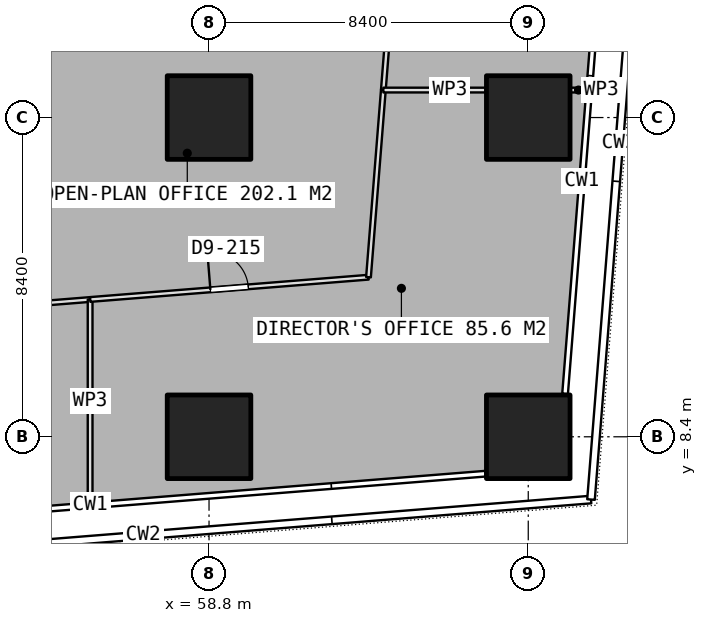
"""IFC4 building model, lengths in metres.
Left out: names, types, materials, properties, quantities, classifications, styles, units other than length and angle.
Written with IfcOpenShell. Run it as: python <this file> out.ifc"""

import sys

from ifc_helpers import new_model, si_unit, direction, frame, frame_2d, origin, origin_2d, place, context, subcontext, project, spatial, rectangle, extrude, element, fill, save


model = new_model("IFC4")
c1 = context("Model", 3, precision=1e-05, world=origin(), true_north=direction((0.0, 1.0)))
c2 = subcontext(c1, "Body", "Model", "MODEL_VIEW")
j1 = project(units=[si_unit("LENGTHUNIT", "METRE"), si_unit("PLANEANGLEUNIT", "RADIAN")], contexts=[c1])
p1 = place(None, origin())
s1 = spatial("IfcSite", under=j1, at=p1, CompositionType="ELEMENT")
p2 = place(p1, origin())
s2 = spatial("IfcBuilding", under=s1, at=p2, CompositionType="ELEMENT")
p3 = place(p2, frame((0.0, 0.0, 66.65)))
s3 = spatial("IfcBuildingStorey", under=s2, at=p3, CompositionType="ELEMENT", Elevation=66.65)
for number, where, z_axis, x_axis in (
    (1, (58.8, 8.4, 0.0), (0.0, 0.0, 1.0), (1.0, 0.0, 0.0)),
    (2, (58.8, 16.8, 0.0), (0.0, 0.0, 1.0), (1.0, 0.0, 0.0)),
    (3, (67.2, 8.4, 0.0), (0.0, 0.0, 1.0), (1.0, 0.0, 0.0)),
    (4, (67.2, 16.8, 0.0), (0.0, 0.0, 1.0), (1.0, 0.0, 0.0)),
):
    element("IfcColumn", number, at=place(p3, frame(where, z_axis=z_axis, x_axis=x_axis)), inside=s3, PredefinedType="COLUMN", context=c2, shape_type="SweptSolid", body=[
        extrude(rectangle(XDim=2.2, YDim=2.2, at=origin_2d()), origin(), (0.0, 0.0, 1.0), 3.75),
    ])
p4 = place(p3, frame((45.307, 11.182, 0.0), z_axis=(0.0, 0.0, 1.0), x_axis=(0.996807957409, 0.079836683593, 0.0)))
e5 = element("IfcWall", 5, at=p4, inside=s3, PredefinedType="PARTITIONING", context=c2, shape_type="SweptSolid", body=[
    extrude(rectangle(XDim=10.397, YDim=0.125, at=frame_2d((5.199, 0.0))), origin(), (0.0, 0.0, 1.0), 3.5),
])
p5 = place(p4, frame((4.298, 0.0, 0.0)))
e6 = element("IfcOpeningElement", 6, at=p5, cuts=e5, PredefinedType="OPENING", context=c2, shape_type="SweptSolid", body=[
    extrude(rectangle(XDim=1.8, YDim=2.1, at=frame_2d((0.9, 1.05))), frame((0.0, 0.073, 0.0), z_axis=(0.0, -1.0, 0.0), x_axis=(1.0, 0.0, 0.0)), (0.0, 0.0, 1.0), 0.145),
])
p6 = place(p3, frame((55.671, 12.012, 0.0), z_axis=(0.0, 0.0, 1.0), x_axis=(0.0, -1.0, 0.0)))
e7 = element("IfcWall", 7, at=p6, inside=s3, PredefinedType="PARTITIONING", context=c2, shape_type="SweptSolid", body=[
    extrude(rectangle(XDim=5.337, YDim=0.125, at=frame_2d((2.668, 0.0))), origin(), (0.0, 0.0, 1.0), 3.5),
])
p7 = place(p3, frame((55.673, 12.013, 0.0), z_axis=(0.0, 0.0, 1.0), x_axis=(0.996811579084, 0.079791451955, 0.0)))
e8 = element("IfcWall", 8, at=p7, inside=s3, PredefinedType="PARTITIONING", context=c2, shape_type="SweptSolid", body=[
    extrude(rectangle(XDim=7.346, YDim=0.125, at=frame_2d((3.673, 0.0))), origin(), (0.0, 0.0, 1.0), 3.5),
])
p8 = place(p7, frame((3.173, 0.0, 0.0)))
e9 = element("IfcOpeningElement", 9, at=p8, cuts=e8, PredefinedType="OPENING", context=c2, shape_type="SweptSolid", body=[
    extrude(rectangle(XDim=1.0, YDim=2.1, at=frame_2d((0.5, 1.05))), frame((0.0, 0.073, 0.0), z_axis=(0.0, -1.0, 0.0), x_axis=(1.0, 0.0, 0.0)), (0.0, 0.0, 1.0), 0.145),
])
p9 = place(p3, frame((62.996, 12.599, 0.0), z_axis=(0.0, 0.0, 1.0), x_axis=(0.079134233178, 0.996863969225, 0.0)))
e10 = element("IfcWall", 10, at=p9, inside=s3, PredefinedType="PARTITIONING", context=c2, shape_type="SweptSolid", body=[
    extrude(rectangle(XDim=4.939, YDim=0.125, at=frame_2d((2.47, 0.0))), origin(), (0.0, 0.0, 1.0), 3.5),
])
p10 = place(p3, frame((63.387, 17.523, 0.0), z_axis=(0.0, 0.0, 1.0), x_axis=(1.0, 0.0, 0.0)))
e11 = element("IfcWall", 11, at=p10, inside=s3, PredefinedType="PARTITIONING", context=c2, shape_type="SweptSolid", body=[
    extrude(rectangle(XDim=2.693, YDim=0.125, at=frame_2d((1.347, 0.0))), origin(), (0.0, 0.0, 1.0), 3.5),
])
p11 = place(p3, frame((68.32, 17.523, 0.0), z_axis=(0.0, 0.0, 1.0), x_axis=(1.0, 0.0, 0.0)))
e12 = element("IfcWall", 12, at=p11, inside=s3, PredefinedType="PARTITIONING", context=c2, shape_type="SweptSolid", body=[
    extrude(rectangle(XDim=0.403, YDim=0.125, at=frame_2d((0.201, 0.0))), origin(), (0.0, 0.0, 1.0), 3.5),
])
p12 = place(p3, frame((63.387, 17.524, 0.0), z_axis=(0.0, 0.0, 1.0), x_axis=(0.079102910118, 0.996866455254, 0.0)))
e13 = element("IfcWall", 13, at=p12, inside=s3, PredefinedType="PARTITIONING", context=c2, shape_type="SweptSolid", body=[
    extrude(rectangle(XDim=8.052, YDim=0.125, at=frame_2d((4.026, 0.0))), origin(), (0.0, 0.0, 1.0), 3.5),
])
p13 = place(p12, frame((3.526, 0.0, 0.0)))
e14 = element("IfcOpeningElement", 14, at=p13, cuts=e13, PredefinedType="OPENING", context=c2, shape_type="SweptSolid", body=[
    extrude(rectangle(XDim=1.0, YDim=2.1, at=frame_2d((0.5, 1.05))), frame((0.0, 0.073, 0.0), z_axis=(0.0, -1.0, 0.0), x_axis=(1.0, 0.0, 0.0)), (0.0, 0.0, 1.0), 0.145),
])
p14 = place(p8, origin())
e15 = element("IfcDoor", 15, at=p14, inside=s3, OperationType="SINGLE_SWING_LEFT", PredefinedType="DOOR", context=c2, shape_type="SweptSolid", body=[
    extrude(rectangle(XDim=1.0, YDim=2.1, at=frame_2d((0.5, 1.05))), frame((0.0, 0.025, 0.0), z_axis=(0.0, -1.0, 0.0), x_axis=(1.0, 0.0, 0.0)), (0.0, 0.0, 1.0), 0.05),
])
fill(e9, e15)
save(model, sys.argv[1])
